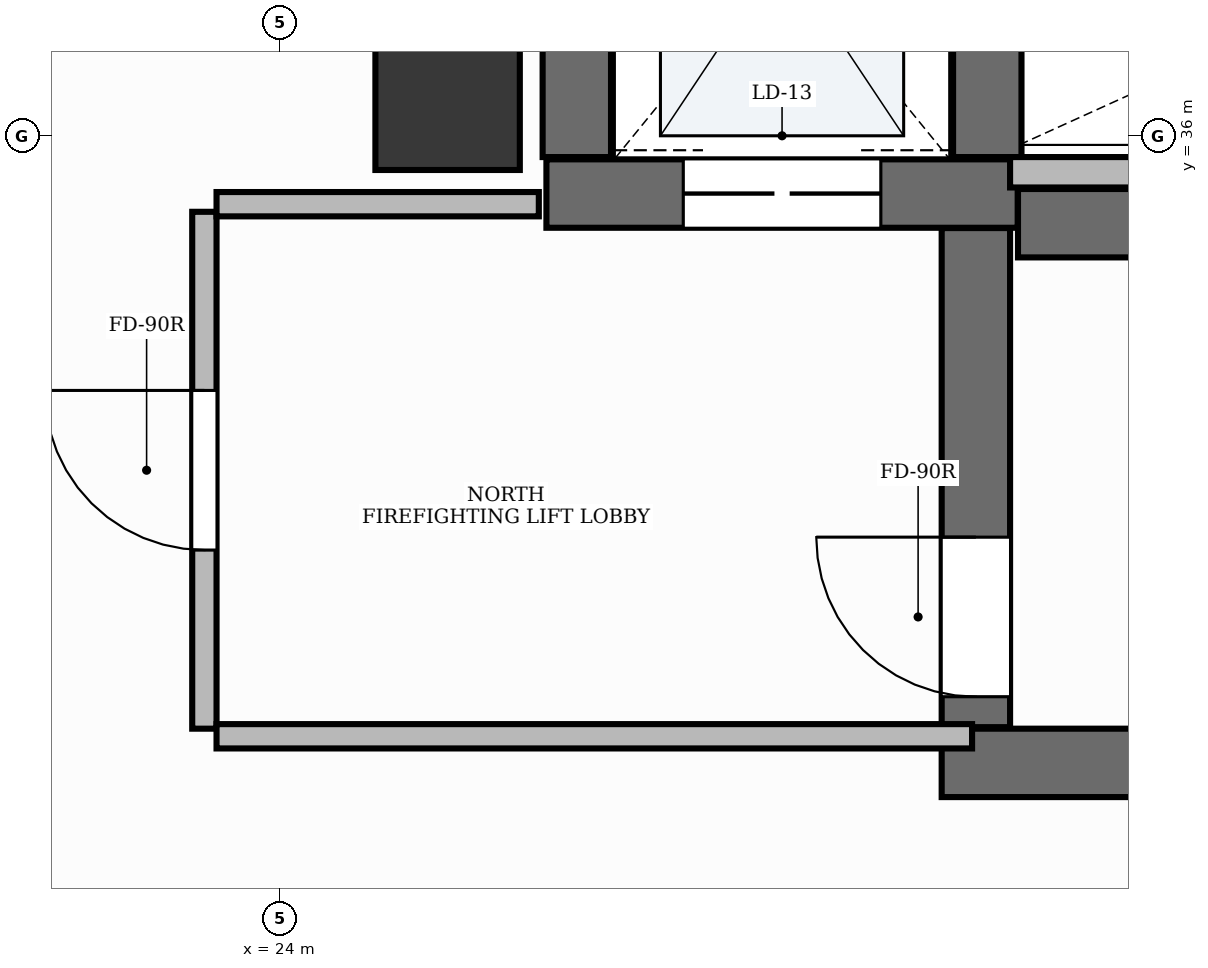
"""IFC4 building model, lengths in metres.
Left out: names, types, materials, properties, quantities, classifications, styles, units other than length and angle.
Written with IfcOpenShell. Run it as: python <this file> out.ifc"""

import sys

from ifc_helpers import new_model, si_unit, direction, frame, frame_2d, origin, origin_2d, place, context, subcontext, project, spatial, rectangle, extrude, element, fill, save


model = new_model("IFC4")
c1 = context("Model", 3, precision=1e-05, world=origin(), true_north=direction((0.0, 1.0)))
c2 = subcontext(c1, "Body", "Model", "MODEL_VIEW")
j1 = project(units=[si_unit("LENGTHUNIT", "METRE"), si_unit("PLANEANGLEUNIT", "RADIAN")], contexts=[c1])
p1 = place(None, origin())
s1 = spatial("IfcSite", under=j1, at=p1, CompositionType="ELEMENT")
p2 = place(p1, origin())
s2 = spatial("IfcBuilding", under=s1, at=p2, CompositionType="ELEMENT")
p3 = place(p2, frame((0.0, 0.0, 84.6)))
s3 = spatial("IfcBuildingStorey", under=s2, at=p3, CompositionType="ELEMENT", Elevation=84.6)
p4 = place(p3, frame((28.852, 35.425, 0.0), z_axis=(0.0, 0.0, 1.0), x_axis=(1.0, 0.0, 0.0)))
e1 = element("IfcWall", 1, at=p4, inside=s3, PredefinedType="SHEAR", context=c2, shape_type="SweptSolid", body=[
    extrude(rectangle(XDim=8.248, YDim=0.45, at=frame_2d((4.124, 0.0))), origin(), (0.0, 0.0, 1.0), 5.1),
])
p5 = place(p3, frame((28.35, 31.875, 0.0), z_axis=(0.0, 0.0, 1.0), x_axis=(1.0, 0.0, 0.0)))
e2 = element("IfcWall", 2, at=p5, inside=s3, PredefinedType="SHEAR", context=c2, shape_type="SweptSolid", body=[
    extrude(rectangle(XDim=8.75, YDim=0.45, at=frame_2d((4.375, 0.0))), origin(), (0.0, 0.0, 1.0), 5.1),
])
p6 = place(p3, frame((28.575, 32.11, 0.0), z_axis=(0.0, 0.0, 1.0), x_axis=(0.0, 1.0, 0.0)))
e3 = element("IfcWall", 3, at=p6, inside=s3, PredefinedType="SHEAR", context=c2, shape_type="SweptSolid", body=[
    extrude(rectangle(XDim=3.283, YDim=0.45, at=frame_2d((1.642, 0.0))), origin(), (0.0, 0.0, 1.0), 5.1),
])
p7 = place(p6, frame((0.2, 0.0, 0.0)))
e4 = element("IfcOpeningElement", 4, at=p7, cuts=e3, PredefinedType="OPENING", context=c2, shape_type="SweptSolid", body=[
    extrude(rectangle(XDim=1.05, YDim=2.15, at=frame_2d((0.525, 1.075))), frame((0.0, 0.24, 0.0), z_axis=(0.0, -1.0, 0.0), x_axis=(1.0, 0.0, 0.0)), (0.0, 0.0, 1.0), 0.48),
])
p8 = place(p3, frame((25.75, 35.62, 0.0), z_axis=(0.0, 0.0, 1.0), x_axis=(1.0, 0.0, 0.0)))
e5 = element("IfcWall", 5, at=p8, inside=s3, PredefinedType="SHEAR", context=c2, shape_type="SweptSolid", body=[
    extrude(rectangle(XDim=3.1, YDim=0.45, at=frame_2d((1.55, 0.0))), origin(), (0.0, 0.0, 1.0), 5.1),
])
p9 = place(p8, frame((0.9, 0.0, 0.0)))
e6 = element("IfcOpeningElement", 6, at=p9, cuts=e5, PredefinedType="OPENING", context=c2, shape_type="SweptSolid", body=[
    extrude(rectangle(XDim=1.3, YDim=2.2, at=frame_2d((0.65, 1.1))), frame((0.0, 0.24, 0.0), z_axis=(0.0, -1.0, 0.0), x_axis=(1.0, 0.0, 0.0)), (0.0, 0.0, 1.0), 0.48),
])
for number, where, z_axis, x_axis in (
    (7, (25.95, 35.86, 0.0), (0.0, 0.0, 1.0), (0.0, 1.0, 0.0)),
    (8, (28.65, 35.86, 0.0), (0.0, 0.0, 1.0), (0.0, 1.0, 0.0)),
):
    element("IfcWall", number, at=place(p3, frame(where, z_axis=z_axis, x_axis=x_axis)), inside=s3, PredefinedType="SHEAR", context=c2, shape_type="SweptSolid", body=[
        extrude(rectangle(XDim=2.7, YDim=0.45, at=frame_2d((1.35, 0.0))), origin(), (0.0, 0.0, 1.0), 5.1),
    ])
p10 = place(p3, frame((25.1, 36.25, -0.0), z_axis=(0.0, 0.0, 1.0), x_axis=(1.0, 0.0, 0.0)))
e9 = element("IfcColumn", 9, at=p10, inside=s3, PredefinedType="PILASTER", context=c2, shape_type="SweptSolid", body=[
    extrude(rectangle(XDim=0.95, YDim=0.95, at=origin_2d()), origin(), (0.0, 0.0, 1.0), 5.101),
])
p11 = place(p3, frame((28.8, 35.76, 0.0), z_axis=(0.0, 0.0, 1.0), x_axis=(1.0, 0.0, 0.0)))
e10 = element("IfcWall", 10, at=p11, inside=s3, PredefinedType="PARTITIONING", context=c2, shape_type="SweptSolid", body=[
    extrude(rectangle(XDim=4.57, YDim=0.2, at=frame_2d((2.285, 0.0))), origin(), (0.0, 0.0, 1.0), 3.96),
])
p12 = place(p3, frame((23.5, 32.1, 0.0), z_axis=(0.0, 0.0, 1.0), x_axis=(0.0, 1.0, 0.0)))
e11 = element("IfcWall", 11, at=p12, inside=s3, PredefinedType="PARTITIONING", context=c2, shape_type="SweptSolid", body=[
    extrude(rectangle(XDim=3.4, YDim=0.16, at=frame_2d((1.7, 0.0))), origin(), (0.0, 0.0, 1.0), 3.96),
])
p13 = place(p12, frame((1.175, 0.0, 0.0)))
e12 = element("IfcOpeningElement", 12, at=p13, cuts=e11, PredefinedType="OPENING", context=c2, shape_type="SweptSolid", body=[
    extrude(rectangle(XDim=1.05, YDim=2.15, at=frame_2d((0.525, 1.075))), frame((0.0, 0.095, 0.0), z_axis=(0.0, -1.0, 0.0), x_axis=(1.0, 0.0, 0.0)), (0.0, 0.0, 1.0), 0.19),
])
p14 = place(p3, frame((23.58, 32.05, 0.0), z_axis=(0.0, 0.0, 1.0), x_axis=(1.0, 0.0, 0.0)))
e13 = element("IfcWall", 13, at=p14, inside=s3, PredefinedType="PARTITIONING", context=c2, shape_type="SweptSolid", body=[
    extrude(rectangle(XDim=4.97, YDim=0.16, at=frame_2d((2.485, 0.0))), origin(), (0.0, 0.0, 1.0), 3.96),
])
p15 = place(p3, frame((23.58, 35.55, 0.0), z_axis=(0.0, 0.0, 1.0), x_axis=(1.0, 0.0, 0.0)))
e14 = element("IfcWall", 14, at=p15, inside=s3, PredefinedType="PARTITIONING", context=c2, shape_type="SweptSolid", body=[
    extrude(rectangle(XDim=2.12, YDim=0.16, at=frame_2d((1.06, 0.0))), origin(), (0.0, 0.0, 1.0), 3.96),
])
p16 = place(p7, origin())
e15 = element("IfcDoor", 15, at=p16, inside=s3, OperationType="SINGLE_SWING_RIGHT", PredefinedType="DOOR", context=c2, shape_type="SweptSolid", body=[
    extrude(rectangle(XDim=1.05, YDim=2.15, at=frame_2d((0.525, 1.075))), frame((0.0, 0.025, 0.0), z_axis=(0.0, -1.0, 0.0), x_axis=(1.0, 0.0, 0.0)), (0.0, 0.0, 1.0), 0.05),
])
fill(e4, e15)
p17 = place(p9, origin())
e16 = element("IfcDoor", 16, at=p17, inside=s3, OperationType="DOUBLE_DOOR_SLIDING", PredefinedType="DOOR", context=c2, shape_type="SweptSolid", body=[
    extrude(rectangle(XDim=1.3, YDim=2.2, at=frame_2d((0.65, 1.1))), frame((0.0, 0.025, 0.0), z_axis=(0.0, -1.0, 0.0), x_axis=(1.0, 0.0, 0.0)), (0.0, 0.0, 1.0), 0.05),
])
fill(e6, e16)
p18 = place(p13, origin())
e17 = element("IfcDoor", 17, at=p18, inside=s3, OperationType="SINGLE_SWING_RIGHT", PredefinedType="DOOR", context=c2, shape_type="SweptSolid", body=[
    extrude(rectangle(XDim=1.05, YDim=2.15, at=frame_2d((0.525, 1.075))), frame((0.0, 0.025, 0.0), z_axis=(0.0, -1.0, 0.0), x_axis=(1.0, 0.0, 0.0)), (0.0, 0.0, 1.0), 0.05),
])
fill(e12, e17)
save(model, sys.argv[1])
